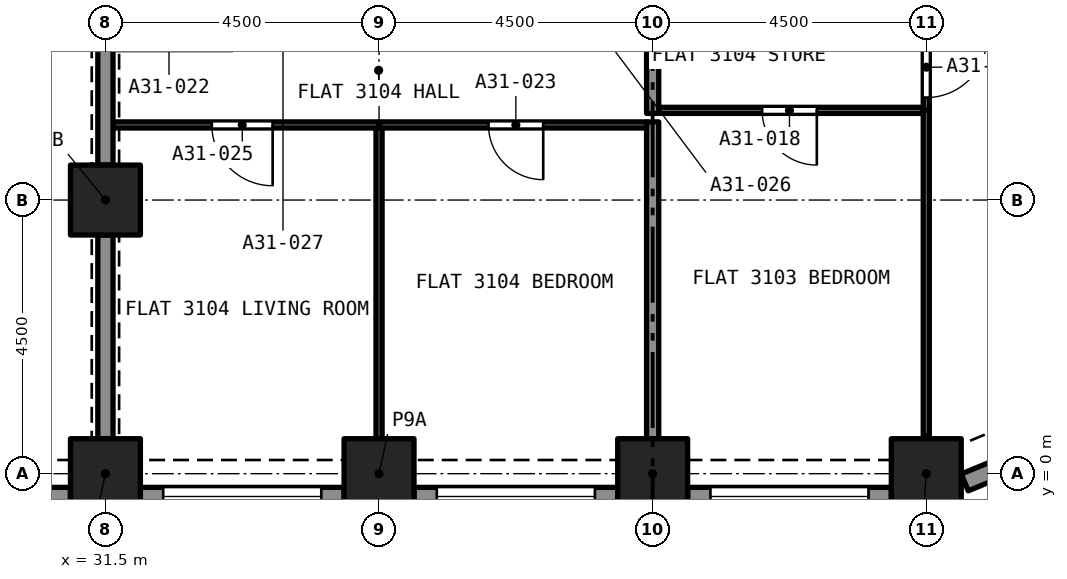
"""IFC4 building model, lengths in metres.
Left out: names, types, materials, properties, quantities, classifications, styles, units other than length and angle.
Written with IfcOpenShell. Run it as: python <this file> out.ifc"""

import sys

from ifc_helpers import new_model, si_unit, direction, frame, frame_2d, origin, origin_2d, place, context, subcontext, project, spatial, rectangle, extrude, element, fill, save


model = new_model("IFC4")
c1 = context("Model", 3, precision=1e-05, world=origin(), true_north=direction((0.0, 1.0)))
c2 = subcontext(c1, "Body", "Model", "MODEL_VIEW")
j1 = project(units=[si_unit("LENGTHUNIT", "METRE"), si_unit("PLANEANGLEUNIT", "RADIAN")], contexts=[c1])
p1 = place(None, origin())
s1 = spatial("IfcSite", under=j1, at=p1, CompositionType="ELEMENT")
p2 = place(p1, origin())
s2 = spatial("IfcBuilding", under=s1, at=p2, CompositionType="ELEMENT")
p3 = place(p2, frame((0.0, 0.0, 112.0)))
s3 = spatial("IfcBuildingStorey", under=s2, at=p3, CompositionType="ELEMENT", Elevation=112.0)
for number, where, z_axis, x_axis in (
    (1, (31.5, 0.0, 0.0), (0.0, 0.0, 1.0), (1.0, 0.0, 0.0)),
    (2, (36.0, 0.0, 0.0), (0.0, 0.0, 1.0), (1.0, 0.0, 0.0)),
    (3, (40.5, 0.0, 0.0), (0.0, 0.0, 1.0), (1.0, 0.0, 0.0)),
    (4, (45.0, 0.0, 0.0), (0.0, 0.0, 1.0), (1.0, 0.0, 0.0)),
    (5, (31.5, 4.5, 0.0), (0.0, 0.0, 1.0), (1.0, 0.0, 0.0)),
):
    element("IfcColumn", number, at=place(p3, frame(where, z_axis=z_axis, x_axis=x_axis)), inside=s3, PredefinedType="COLUMN", context=c2, shape_type="SweptSolid", body=[
        extrude(rectangle(XDim=1.15, YDim=1.15, at=origin_2d()), origin(), (0.0, 0.0, 1.0), 3.2),
    ])
p4 = place(p3, frame((30.925, -0.375, 0.0), z_axis=(0.0, 0.0, 1.0), x_axis=(-1.0, 0.0, 0.0)))
e6 = element("IfcWall", 6, at=p4, inside=s3, PredefinedType="SOLIDWALL", context=c2, shape_type="SweptSolid", body=[
    extrude(rectangle(XDim=3.35, YDim=0.3, at=frame_2d((1.675, 0.0))), origin(), (0.0, 0.0, 1.0), 3.2),
])
p5 = place(p4, frame((0.375, 0.0, 0.45)))
e7 = element("IfcOpeningElement", 7, at=p5, cuts=e6, PredefinedType="OPENING", context=c2, shape_type="SweptSolid", body=[
    extrude(rectangle(XDim=2.6, YDim=1.95, at=frame_2d((1.3, 0.975))), frame((0.0, 0.16, 0.0), z_axis=(0.0, -1.0, 0.0), x_axis=(1.0, 0.0, 0.0)), (0.0, 0.0, 1.0), 0.32),
])
p6 = place(p3, frame((35.425, -0.375, 0.0), z_axis=(0.0, 0.0, 1.0), x_axis=(-1.0, 0.0, 0.0)))
e8 = element("IfcWall", 8, at=p6, inside=s3, PredefinedType="SOLIDWALL", context=c2, shape_type="SweptSolid", body=[
    extrude(rectangle(XDim=3.35, YDim=0.3, at=frame_2d((1.675, 0.0))), origin(), (0.0, 0.0, 1.0), 3.2),
])
p7 = place(p6, frame((0.375, 0.0, 0.45)))
e9 = element("IfcOpeningElement", 9, at=p7, cuts=e8, PredefinedType="OPENING", context=c2, shape_type="SweptSolid", body=[
    extrude(rectangle(XDim=2.6, YDim=1.95, at=frame_2d((1.3, 0.975))), frame((0.0, 0.16, 0.0), z_axis=(0.0, -1.0, 0.0), x_axis=(1.0, 0.0, 0.0)), (0.0, 0.0, 1.0), 0.32),
])
p8 = place(p3, frame((39.925, -0.375, 0.0), z_axis=(0.0, 0.0, 1.0), x_axis=(-1.0, 0.0, 0.0)))
e10 = element("IfcWall", 10, at=p8, inside=s3, PredefinedType="SOLIDWALL", context=c2, shape_type="SweptSolid", body=[
    extrude(rectangle(XDim=3.35, YDim=0.3, at=frame_2d((1.675, 0.0))), origin(), (0.0, 0.0, 1.0), 3.2),
])
p9 = place(p8, frame((0.375, 0.0, 0.45)))
e11 = element("IfcOpeningElement", 11, at=p9, cuts=e10, PredefinedType="OPENING", context=c2, shape_type="SweptSolid", body=[
    extrude(rectangle(XDim=2.6, YDim=1.95, at=frame_2d((1.3, 0.975))), frame((0.0, 0.16, 0.0), z_axis=(0.0, -1.0, 0.0), x_axis=(1.0, 0.0, 0.0)), (0.0, 0.0, 1.0), 0.32),
])
p10 = place(p3, frame((44.425, -0.375, 0.0), z_axis=(0.0, 0.0, 1.0), x_axis=(-1.0, 0.0, 0.0)))
e12 = element("IfcWall", 12, at=p10, inside=s3, PredefinedType="SOLIDWALL", context=c2, shape_type="SweptSolid", body=[
    extrude(rectangle(XDim=3.35, YDim=0.3, at=frame_2d((1.675, 0.0))), origin(), (0.0, 0.0, 1.0), 3.2),
])
p11 = place(p10, frame((0.375, 0.0, 0.45)))
e13 = element("IfcOpeningElement", 13, at=p11, cuts=e12, PredefinedType="OPENING", context=c2, shape_type="SweptSolid", body=[
    extrude(rectangle(XDim=2.6, YDim=1.95, at=frame_2d((1.3, 0.975))), frame((0.0, 0.16, 0.0), z_axis=(0.0, -1.0, 0.0), x_axis=(1.0, 0.0, 0.0)), (0.0, 0.0, 1.0), 0.32),
])
p12 = place(p3, frame((47.631, 0.684, 0.0), z_axis=(0.0, 0.0, 1.0), x_axis=(-0.923862802911, -0.382723818695, 0.0)))
e14 = element("IfcWall", 14, at=p12, inside=s3, PredefinedType="SOLIDWALL", context=c2, shape_type="SweptSolid", body=[
    extrude(rectangle(XDim=2.164, YDim=0.3, at=frame_2d((1.082, 0.0))), origin(), (0.0, 0.0, 1.0), 3.2),
])
p13 = place(p12, frame((0.271, 0.0, 0.45)))
e15 = element("IfcOpeningElement", 15, at=p13, cuts=e14, PredefinedType="OPENING", context=c2, shape_type="SweptSolid", body=[
    extrude(rectangle(XDim=1.4, YDim=1.95, at=frame_2d((0.7, 0.975))), frame((0.0, 0.16, 0.0), z_axis=(0.0, -1.0, 0.0), x_axis=(1.0, 0.0, 0.0)), (0.0, 0.0, 1.0), 0.32),
])
p14 = place(p3, frame((44.95, 5.975, 0.0), z_axis=(0.0, 0.0, 1.0), x_axis=(-1.0, 0.0, 0.0)))
e16 = element("IfcWall", 16, at=p14, inside=s3, PredefinedType="PARTITIONING", context=c2, shape_type="SweptSolid", body=[
    extrude(rectangle(XDim=4.35, YDim=0.1, at=frame_2d((2.175, 0.0))), origin(), (0.0, 0.0, 1.0), 2.9),
])
p15 = place(p14, frame((1.75, 0.0, 0.0)))
e17 = element("IfcOpeningElement", 17, at=p15, cuts=e16, PredefinedType="OPENING", context=c2, shape_type="SweptSolid", body=[
    extrude(rectangle(XDim=0.9, YDim=2.1, at=frame_2d((0.45, 1.05))), frame((0.0, 0.06, 0.0), z_axis=(0.0, -1.0, 0.0), x_axis=(1.0, 0.0, 0.0)), (0.0, 0.0, 1.0), 0.12),
])
p16 = place(p3, frame((45.0, 0.622, 0.0), z_axis=(0.0, 0.0, 1.0), x_axis=(0.0, 1.0, 0.0)))
e18 = element("IfcWall", 18, at=p16, inside=s3, PredefinedType="PARTITIONING", context=c2, shape_type="SweptSolid", body=[
    extrude(rectangle(XDim=5.353, YDim=0.1, at=frame_2d((2.676, 0.0))), origin(), (0.0, 0.0, 1.0), 2.9),
])
p17 = place(p3, frame((40.5, 0.575, 0.0), z_axis=(0.0, 0.0, 1.0), x_axis=(0.0, 1.0, 0.0)))
e19 = element("IfcWall", 19, at=p17, inside=s3, PredefinedType="PARTITIONING", context=c2, shape_type="SweptSolid", body=[
    extrude(rectangle(XDim=5.21, YDim=0.2, at=frame_2d((2.605, 0.0))), origin(), (0.0, 0.0, 1.0), 2.9),
])
p18 = place(p3, frame((45.0, 14.0, 0.0), z_axis=(0.0, 0.0, 1.0), x_axis=(0.0, -1.0, 0.0)))
e20 = element("IfcWall", 20, at=p18, inside=s3, PredefinedType="PARTITIONING", context=c2, shape_type="SweptSolid", body=[
    extrude(rectangle(XDim=8.025, YDim=0.1, at=frame_2d((4.012, 0.0))), origin(), (0.0, 0.0, 1.0), 2.9),
])
p19 = place(p18, frame((6.815, 0.0, 0.0)))
e21 = element("IfcOpeningElement", 21, at=p19, cuts=e20, PredefinedType="OPENING", context=c2, shape_type="SweptSolid", body=[
    extrude(rectangle(XDim=1.0, YDim=2.1, at=frame_2d((0.5, 1.05))), frame((0.0, 0.06, 0.0), z_axis=(0.0, -1.0, 0.0), x_axis=(1.0, 0.0, 0.0)), (0.0, 0.0, 1.0), 0.12),
])
p20 = place(p3, frame((40.5, 5.925, 0.0), z_axis=(0.0, 0.0, 1.0), x_axis=(0.0, 1.0, 0.0)))
e22 = element("IfcWall", 22, at=p20, inside=s3, PredefinedType="PARTITIONING", context=c2, shape_type="SweptSolid", body=[
    extrude(rectangle(XDim=8.075, YDim=0.2, at=frame_2d((4.038, 0.0))), origin(), (0.0, 0.0, 1.0), 2.9),
])
p21 = place(p3, frame((40.4, 5.735, 0.0), z_axis=(0.0, 0.0, 1.0), x_axis=(-1.0, 0.0, 0.0)))
e23 = element("IfcWall", 23, at=p21, inside=s3, PredefinedType="PARTITIONING", context=c2, shape_type="SweptSolid", body=[
    extrude(rectangle(XDim=4.4, YDim=0.1, at=frame_2d((2.2, 0.0))), origin(), (0.0, 0.0, 1.0), 2.9),
])
p22 = place(p21, frame((1.7, 0.0, 0.0)))
e24 = element("IfcOpeningElement", 24, at=p22, cuts=e23, PredefinedType="OPENING", context=c2, shape_type="SweptSolid", body=[
    extrude(rectangle(XDim=0.9, YDim=2.1, at=frame_2d((0.45, 1.05))), frame((0.0, 0.06, 0.0), z_axis=(0.0, -1.0, 0.0), x_axis=(1.0, 0.0, 0.0)), (0.0, 0.0, 1.0), 0.12),
])
p23 = place(p3, frame((36.0, 0.575, 0.0), z_axis=(0.0, 0.0, 1.0), x_axis=(0.0, 1.0, 0.0)))
e25 = element("IfcWall", 25, at=p23, inside=s3, PredefinedType="PARTITIONING", context=c2, shape_type="SweptSolid", body=[
    extrude(rectangle(XDim=5.11, YDim=0.1, at=frame_2d((2.555, 0.0))), origin(), (0.0, 0.0, 1.0), 2.9),
])
p24 = place(p3, frame((36.0, 5.735, 0.0), z_axis=(0.0, 0.0, 1.0), x_axis=(-1.0, 0.0, 0.0)))
e26 = element("IfcWall", 26, at=p24, inside=s3, PredefinedType="PARTITIONING", context=c2, shape_type="SweptSolid", body=[
    extrude(rectangle(XDim=4.375, YDim=0.1, at=frame_2d((2.188, 0.0))), origin(), (0.0, 0.0, 1.0), 2.9),
])
p25 = place(p24, frame((1.75, 0.0, 0.0)))
e27 = element("IfcOpeningElement", 27, at=p25, cuts=e26, PredefinedType="OPENING", context=c2, shape_type="SweptSolid", body=[
    extrude(rectangle(XDim=1.0, YDim=2.1, at=frame_2d((0.5, 1.05))), frame((0.0, 0.06, 0.0), z_axis=(0.0, -1.0, 0.0), x_axis=(1.0, 0.0, 0.0)), (0.0, 0.0, 1.0), 0.12),
])
for number, where, z_axis, x_axis in (
    (28, (31.5, 0.575, 0.0), (0.0, 0.0, 1.0), (0.0, 1.0, 0.0)),
    (29, (31.5, 5.075, 0.0), (0.0, 0.0, 1.0), (0.0, 1.0, 0.0)),
):
    element("IfcWall", number, at=place(p3, frame(where, z_axis=z_axis, x_axis=x_axis)), inside=s3, PredefinedType="PARTITIONING", context=c2, shape_type="SweptSolid", body=[
        extrude(rectangle(XDim=3.35, YDim=0.25, at=frame_2d((1.675, 0.0))), origin(), (0.0, 0.0, 1.0), 2.38),
    ])
p26 = place(p7, origin())
e30 = element("IfcWindow", 30, at=p26, inside=s3, PartitioningType="SINGLE_PANEL", PredefinedType="WINDOW", context=c2, shape_type="SweptSolid", body=[
    extrude(rectangle(XDim=2.6, YDim=1.95, at=frame_2d((1.3, 0.975))), frame((0.0, 0.03, 0.0), z_axis=(0.0, -1.0, 0.0), x_axis=(1.0, 0.0, 0.0)), (0.0, 0.0, 1.0), 0.06),
])
fill(e9, e30)
p27 = place(p9, origin())
e31 = element("IfcWindow", 31, at=p27, inside=s3, PartitioningType="SINGLE_PANEL", PredefinedType="WINDOW", context=c2, shape_type="SweptSolid", body=[
    extrude(rectangle(XDim=2.6, YDim=1.95, at=frame_2d((1.3, 0.975))), frame((0.0, 0.03, 0.0), z_axis=(0.0, -1.0, 0.0), x_axis=(1.0, 0.0, 0.0)), (0.0, 0.0, 1.0), 0.06),
])
fill(e11, e31)
p28 = place(p11, origin())
e32 = element("IfcWindow", 32, at=p28, inside=s3, PartitioningType="SINGLE_PANEL", PredefinedType="WINDOW", context=c2, shape_type="SweptSolid", body=[
    extrude(rectangle(XDim=2.6, YDim=1.95, at=frame_2d((1.3, 0.975))), frame((0.0, 0.03, 0.0), z_axis=(0.0, -1.0, 0.0), x_axis=(1.0, 0.0, 0.0)), (0.0, 0.0, 1.0), 0.06),
])
fill(e13, e32)
p29 = place(p15, origin())
e33 = element("IfcDoor", 33, at=p29, inside=s3, OperationType="SINGLE_SWING_RIGHT", PredefinedType="DOOR", context=c2, shape_type="SweptSolid", body=[
    extrude(rectangle(XDim=0.9, YDim=2.1, at=frame_2d((0.45, 1.05))), frame((0.0, 0.025, 0.0), z_axis=(0.0, -1.0, 0.0), x_axis=(1.0, 0.0, 0.0)), (0.0, 0.0, 1.0), 0.05),
])
fill(e17, e33)
p30 = place(p19, origin())
e34 = element("IfcDoor", 34, at=p30, inside=s3, OperationType="SINGLE_SWING_RIGHT", PredefinedType="DOOR", context=c2, shape_type="SweptSolid", body=[
    extrude(rectangle(XDim=1.0, YDim=2.1, at=frame_2d((0.5, 1.05))), frame((0.0, 0.025, 0.0), z_axis=(0.0, -1.0, 0.0), x_axis=(1.0, 0.0, 0.0)), (0.0, 0.0, 1.0), 0.05),
])
fill(e21, e34)
p31 = place(p22, origin())
e35 = element("IfcDoor", 35, at=p31, inside=s3, OperationType="SINGLE_SWING_LEFT", PredefinedType="DOOR", context=c2, shape_type="SweptSolid", body=[
    extrude(rectangle(XDim=0.9, YDim=2.1, at=frame_2d((0.45, 1.05))), frame((0.0, 0.025, 0.0), z_axis=(0.0, -1.0, 0.0), x_axis=(1.0, 0.0, 0.0)), (0.0, 0.0, 1.0), 0.05),
])
fill(e24, e35)
p32 = place(p25, origin())
e36 = element("IfcDoor", 36, at=p32, inside=s3, OperationType="SINGLE_SWING_RIGHT", PredefinedType="DOOR", context=c2, shape_type="SweptSolid", body=[
    extrude(rectangle(XDim=1.0, YDim=2.1, at=frame_2d((0.5, 1.05))), frame((0.0, 0.025, 0.0), z_axis=(0.0, -1.0, 0.0), x_axis=(1.0, 0.0, 0.0)), (0.0, 0.0, 1.0), 0.05),
])
fill(e27, e36)
save(model, sys.argv[1])
